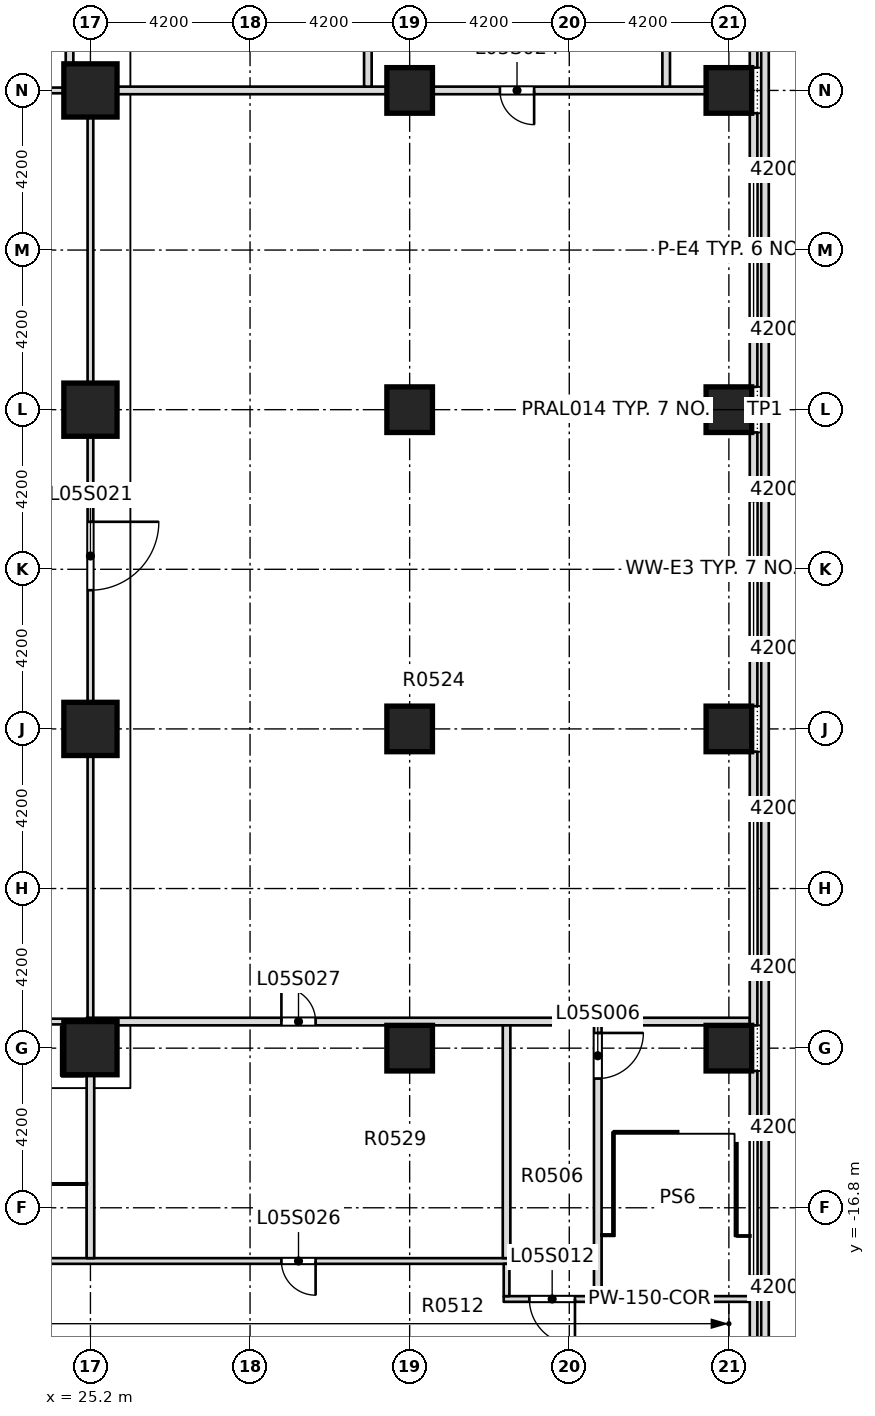
"""IFC4 building model, lengths in metres.
Left out: names, types, materials, properties, quantities, classifications, styles, units other than length and angle.
Written with IfcOpenShell. Run it as: python <this file> out.ifc"""

import sys

from ifc_helpers import new_model, si_unit, direction, frame, frame_2d, origin, origin_2d, place, context, subcontext, project, spatial, rectangle, extrude, element, fill, save


model = new_model("IFC4")
c1 = context("Model", 3, precision=1e-05, world=origin(), true_north=direction((0.0, 1.0)))
c2 = subcontext(c1, "Body", "Model", "MODEL_VIEW")
j1 = project(units=[si_unit("LENGTHUNIT", "METRE"), si_unit("PLANEANGLEUNIT", "RADIAN")], contexts=[c1])
p1 = place(None, origin())
s1 = spatial("IfcSite", under=j1, at=p1, CompositionType="ELEMENT")
p2 = place(p1, origin())
s2 = spatial("IfcBuilding", under=s1, at=p2, CompositionType="ELEMENT")
p3 = place(p2, frame((0.0, 0.0, 30.0)))
s3 = spatial("IfcBuildingStorey", under=s2, at=p3, CompositionType="ELEMENT", Elevation=30.0)
for number, where, z_axis, x_axis in (
    (1, (25.2, -12.6, -0.4), (0.0, 0.0, 1.0), (1.0, 0.0, 0.0)),
    (2, (25.2, -4.2, -0.4), (0.0, 0.0, 1.0), (1.0, 0.0, 0.0)),
    (3, (25.2, 4.2, -0.4), (0.0, 0.0, 1.0), (1.0, 0.0, 0.0)),
    (4, (25.2, 12.6, -0.4), (0.0, 0.0, 1.0), (1.0, 0.0, 0.0)),
):
    element("IfcColumn", number, at=place(p3, frame(where, z_axis=z_axis, x_axis=x_axis)), inside=s3, PredefinedType="COLUMN", context=c2, shape_type="SweptSolid", body=[
        extrude(rectangle(XDim=1.4, YDim=1.4, at=origin_2d()), origin(), (0.0, 0.0, 1.0), 4.58),
    ])
for number, where, z_axis, x_axis in (
    (5, (33.6, -12.6, 0.0), (0.0, 0.0, 1.0), (1.0, 0.0, 0.0)),
    (6, (42.0, -12.6, 0.0), (0.0, 0.0, 1.0), (1.0, 0.0, 0.0)),
    (7, (33.6, -4.2, 0.0), (0.0, 0.0, 1.0), (1.0, 0.0, 0.0)),
    (8, (42.0, -4.2, 0.0), (0.0, 0.0, 1.0), (1.0, 0.0, 0.0)),
    (9, (33.6, 4.2, 0.0), (0.0, 0.0, 1.0), (1.0, 0.0, 0.0)),
    (10, (42.0, 4.2, 0.0), (0.0, 0.0, 1.0), (1.0, 0.0, 0.0)),
    (11, (33.6, 12.6, 0.0), (0.0, 0.0, 1.0), (1.0, 0.0, 0.0)),
    (12, (42.0, 12.6, 0.0), (0.0, 0.0, 1.0), (1.0, 0.0, 0.0)),
):
    element("IfcColumn", number, at=place(p3, frame(where, z_axis=z_axis, x_axis=x_axis)), inside=s3, PredefinedType="COLUMN", context=c2, shape_type="SweptSolid", body=[
        extrude(rectangle(XDim=1.2, YDim=1.2, at=origin_2d()), origin(), (0.0, 0.0, 1.0), 4.18),
    ])
p4 = place(p3, frame((42.95, -21.85, 4.5), z_axis=(0.0, 0.0, 1.0), x_axis=(0.0, 1.0, 0.0)))
e13 = element("IfcWall", 13, at=p4, inside=s3, PredefinedType="PARAPET", context=c2, shape_type="SweptSolid", body=[
    extrude(rectangle(XDim=52.1, YDim=0.2, at=frame_2d((26.05, 0.0))), origin(), (0.0, 0.0, 1.0), 1.2),
])
p5 = place(p3, frame((36.075, -19.2, 0.0), z_axis=(0.0, 0.0, 1.0), x_axis=(1.0, 0.0, 0.0)))
e14 = element("IfcWall", 14, at=p5, inside=s3, PredefinedType="PARTITIONING", context=c2, shape_type="SweptSolid", body=[
    extrude(rectangle(XDim=6.475, YDim=0.15, at=frame_2d((3.238, 0.0))), origin(), (0.0, 0.0, 1.0), 4.18),
])
p6 = place(p5, frame((0.675, 0.0, 0.0)))
e15 = element("IfcOpeningElement", 15, at=p6, cuts=e14, PredefinedType="OPENING", context=c2, shape_type="SweptSolid", body=[
    extrude(rectangle(XDim=1.2, YDim=2.1, at=frame_2d((0.6, 1.05))), frame((0.0, 0.085, 0.0), z_axis=(0.0, -1.0, 0.0), x_axis=(1.0, 0.0, 0.0)), (0.0, 0.0, 1.0), 0.17),
])
p7 = place(p3, frame((12.25, -18.2, 0.0), z_axis=(0.0, 0.0, 1.0), x_axis=(1.0, 0.0, 0.0)))
e16 = element("IfcWall", 16, at=p7, inside=s3, PredefinedType="PARTITIONING", context=c2, shape_type="SweptSolid", body=[
    extrude(rectangle(XDim=24.0, YDim=0.15, at=frame_2d((12.0, 0.0))), origin(), (0.0, 0.0, 1.0), 4.18),
])
p8 = place(p7, frame((5.15, 0.0, 0.0)))
e17 = element("IfcOpeningElement", 17, at=p8, cuts=e16, PredefinedType="OPENING", context=c2, shape_type="SweptSolid", body=[
    extrude(rectangle(XDim=1.2, YDim=2.1, at=frame_2d((0.6, 1.05))), frame((0.0, 0.085, 0.0), z_axis=(0.0, -1.0, 0.0), x_axis=(1.0, 0.0, 0.0)), (0.0, 0.0, 1.0), 0.17),
])
p9 = place(p7, frame((17.975, 0.0, 0.0)))
e18 = element("IfcOpeningElement", 18, at=p9, cuts=e16, PredefinedType="OPENING", context=c2, shape_type="SweptSolid", body=[
    extrude(rectangle(XDim=0.9, YDim=2.1, at=frame_2d((0.45, 1.05))), frame((0.0, 0.085, 0.0), z_axis=(0.0, -1.0, 0.0), x_axis=(1.0, 0.0, 0.0)), (0.0, 0.0, 1.0), 0.17),
])
p10 = place(p7, frame((1.825, 0.0, 0.0)))
e19 = element("IfcOpeningElement", 19, at=p10, cuts=e16, PredefinedType="OPENING", context=c2, shape_type="SweptSolid", body=[
    extrude(rectangle(XDim=0.7, YDim=2.1, at=frame_2d((0.35, 1.05))), frame((0.0, 0.085, 0.0), z_axis=(0.0, -1.0, 0.0), x_axis=(1.0, 0.0, 0.0)), (0.0, 0.0, 1.0), 0.17),
])
p11 = place(p3, frame((16.725, -11.9, 0.0), z_axis=(0.0, 0.0, 1.0), x_axis=(1.0, 0.0, 0.0)))
e20 = element("IfcWall", 20, at=p11, inside=s3, PredefinedType="PARTITIONING", context=c2, shape_type="SweptSolid", body=[
    extrude(rectangle(XDim=8.575, YDim=0.15, at=frame_2d((4.288, 0.0))), origin(), (0.0, 0.0, 1.0), 4.18),
])
p12 = place(p3, frame((25.1, -11.9, 0.0), z_axis=(0.0, 0.0, 1.0), x_axis=(1.0, 0.0, 0.0)))
e21 = element("IfcWall", 21, at=p12, inside=s3, PredefinedType="PARTITIONING", context=c2, shape_type="SweptSolid", body=[
    extrude(rectangle(XDim=17.45, YDim=0.2, at=frame_2d((8.725, 0.0))), origin(), (0.0, 0.0, 1.0), 4.18),
])
p13 = place(p12, frame((5.125, 0.0, 0.0)))
e22 = element("IfcOpeningElement", 22, at=p13, cuts=e21, PredefinedType="OPENING", context=c2, shape_type="SweptSolid", body=[
    extrude(rectangle(XDim=0.9, YDim=2.1, at=frame_2d((0.45, 1.05))), frame((0.0, 0.11, 0.0), z_axis=(0.0, -1.0, 0.0), x_axis=(1.0, 0.0, 0.0)), (0.0, 0.0, 1.0), 0.22),
])
p14 = place(p3, frame((16.725, 12.6, 0.0), z_axis=(0.0, 0.0, 1.0), x_axis=(1.0, 0.0, 0.0)))
e23 = element("IfcWall", 23, at=p14, inside=s3, PredefinedType="PARTITIONING", context=c2, shape_type="SweptSolid", body=[
    extrude(rectangle(XDim=8.55, YDim=0.15, at=frame_2d((4.275, 0.0))), origin(), (0.0, 0.0, 1.0), 4.18),
])
p15 = place(p3, frame((25.125, 12.6, 0.0), z_axis=(0.0, 0.0, 1.0), x_axis=(1.0, 0.0, 0.0)))
e24 = element("IfcWall", 24, at=p15, inside=s3, PredefinedType="PARTITIONING", context=c2, shape_type="SweptSolid", body=[
    extrude(rectangle(XDim=17.425, YDim=0.2, at=frame_2d((8.712, 0.0))), origin(), (0.0, 0.0, 1.0), 4.18),
])
p16 = place(p15, frame((10.85, 0.0, 0.0)))
e25 = element("IfcOpeningElement", 25, at=p16, cuts=e24, PredefinedType="OPENING", context=c2, shape_type="SweptSolid", body=[
    extrude(rectangle(XDim=0.9, YDim=2.1, at=frame_2d((0.45, 1.05))), frame((0.0, 0.11, 0.0), z_axis=(0.0, -1.0, 0.0), x_axis=(1.0, 0.0, 0.0)), (0.0, 0.0, 1.0), 0.22),
])
p17 = place(p3, frame((24.65, 12.675, 0.0), z_axis=(0.0, 0.0, 1.0), x_axis=(0.0, 1.0, 0.0)))
e26 = element("IfcWall", 26, at=p17, inside=s3, PredefinedType="PARTITIONING", context=c2, shape_type="SweptSolid", body=[
    extrude(rectangle(XDim=9.0, YDim=0.2, at=frame_2d((4.5, 0.0))), origin(), (0.0, 0.0, 1.0), 4.18),
])
p18 = place(p3, frame((25.2, -18.125, 0.0), z_axis=(0.0, 0.0, 1.0), x_axis=(0.0, 1.0, 0.0)))
e27 = element("IfcWall", 27, at=p18, inside=s3, PredefinedType="PARTITIONING", context=c2, shape_type="SweptSolid", body=[
    extrude(rectangle(XDim=6.125, YDim=0.2, at=frame_2d((3.062, 0.0))), origin(), (0.0, 0.0, 1.0), 4.18),
])
p19 = place(p3, frame((25.2, -11.8, 0.0), z_axis=(0.0, 0.0, 1.0), x_axis=(0.0, 1.0, 0.0)))
e28 = element("IfcWall", 28, at=p19, inside=s3, PredefinedType="PARTITIONING", context=c2, shape_type="SweptSolid", body=[
    extrude(rectangle(XDim=24.3, YDim=0.15, at=frame_2d((12.15, 0.0))), origin(), (0.0, 0.0, 1.0), 4.18),
])
p20 = place(p19, frame((11.25, 0.0, 0.0)))
e29 = element("IfcOpeningElement", 29, at=p20, cuts=e28, PredefinedType="OPENING", context=c2, shape_type="SweptSolid", body=[
    extrude(rectangle(XDim=1.8, YDim=2.1, at=frame_2d((0.9, 1.05))), frame((0.0, 0.085, 0.0), z_axis=(0.0, -1.0, 0.0), x_axis=(1.0, 0.0, 0.0)), (0.0, 0.0, 1.0), 0.17),
])
p21 = place(p3, frame((32.5, 12.7, 0.0), z_axis=(0.0, 0.0, 1.0), x_axis=(0.0, 1.0, 0.0)))
e30 = element("IfcWall", 30, at=p21, inside=s3, PredefinedType="PARTITIONING", context=c2, shape_type="SweptSolid", body=[
    extrude(rectangle(XDim=8.975, YDim=0.2, at=frame_2d((4.488, 0.0))), origin(), (0.0, 0.0, 1.0), 4.18),
])
p22 = place(p3, frame((36.15, -19.125, 0.0), z_axis=(0.0, 0.0, 1.0), x_axis=(0.0, 1.0, 0.0)))
e31 = element("IfcWall", 31, at=p22, inside=s3, PredefinedType="PARTITIONING", context=c2, shape_type="SweptSolid", body=[
    extrude(rectangle(XDim=0.85, YDim=0.15, at=frame_2d((0.425, 0.0))), origin(), (0.0, 0.0, 1.0), 4.18),
])
p23 = place(p3, frame((36.15, -18.125, 0.0), z_axis=(0.0, 0.0, 1.0), x_axis=(0.0, 1.0, 0.0)))
e32 = element("IfcWall", 32, at=p23, inside=s3, PredefinedType="PARTITIONING", context=c2, shape_type="SweptSolid", body=[
    extrude(rectangle(XDim=6.125, YDim=0.2, at=frame_2d((3.062, 0.0))), origin(), (0.0, 0.0, 1.0), 4.18),
])
p24 = place(p3, frame((38.55, -19.125, 0.0), z_axis=(0.0, 0.0, 1.0), x_axis=(0.0, 1.0, 0.0)))
e33 = element("IfcWall", 33, at=p24, inside=s3, PredefinedType="PARTITIONING", context=c2, shape_type="SweptSolid", body=[
    extrude(rectangle(XDim=7.125, YDim=0.2, at=frame_2d((3.562, 0.0))), origin(), (0.0, 0.0, 1.0), 4.18),
])
p25 = place(p24, frame((5.725, 0.0, 0.0)))
e34 = element("IfcOpeningElement", 34, at=p25, cuts=e33, PredefinedType="OPENING", context=c2, shape_type="SweptSolid", body=[
    extrude(rectangle(XDim=1.2, YDim=2.1, at=frame_2d((0.6, 1.05))), frame((0.0, 0.11, 0.0), z_axis=(0.0, -1.0, 0.0), x_axis=(1.0, 0.0, 0.0)), (0.0, 0.0, 1.0), 0.22),
])
p26 = place(p3, frame((40.35, 12.7, 0.0), z_axis=(0.0, 0.0, 1.0), x_axis=(0.0, 1.0, 0.0)))
e35 = element("IfcWall", 35, at=p26, inside=s3, PredefinedType="PARTITIONING", context=c2, shape_type="SweptSolid", body=[
    extrude(rectangle(XDim=8.525, YDim=0.2, at=frame_2d((4.263, 0.0))), origin(), (0.0, 0.0, 1.0), 4.18),
])
p27 = place(p26, frame((3.812, 0.0, 0.0)))
e36 = element("IfcOpeningElement", 36, at=p27, cuts=e35, PredefinedType="OPENING", context=c2, shape_type="SweptSolid", body=[
    extrude(rectangle(XDim=0.9, YDim=2.1, at=frame_2d((0.45, 1.05))), frame((0.0, 0.11, 0.0), z_axis=(0.0, -1.0, 0.0), x_axis=(1.0, 0.0, 0.0)), (0.0, 0.0, 1.0), 0.22),
])
p28 = place(p3, frame((42.65, -20.4, 0.0), z_axis=(0.0, 0.0, 1.0), x_axis=(0.0, 1.0, 0.0)))
e37 = element("IfcWall", 37, at=p28, inside=s3, PredefinedType="STANDARD", context=c2, shape_type="SweptSolid", body=[
    extrude(rectangle(XDim=7.2, YDim=0.2, at=frame_2d((3.6, 0.0))), origin(), (0.0, 0.0, 1.0), 4.18),
])
p29 = place(p28, frame((1.8, 0.0, 0.9)))
e38 = element("IfcOpeningElement", 38, at=p29, cuts=e37, PredefinedType="OPENING", context=c2, shape_type="SweptSolid", body=[
    extrude(rectangle(XDim=3.6, YDim=2.4, at=frame_2d((1.8, 1.2))), frame((0.0, 0.11, 0.0), z_axis=(0.0, -1.0, 0.0), x_axis=(1.0, 0.0, 0.0)), (0.0, 0.0, 1.0), 0.22),
])
p30 = place(p3, frame((42.65, -12.0, 0.0), z_axis=(0.0, 0.0, 1.0), x_axis=(0.0, 1.0, 0.0)))
e39 = element("IfcWall", 39, at=p30, inside=s3, PredefinedType="STANDARD", context=c2, shape_type="SweptSolid", body=[
    extrude(rectangle(XDim=7.2, YDim=0.2, at=frame_2d((3.6, 0.0))), origin(), (0.0, 0.0, 1.0), 4.18),
])
p31 = place(p30, frame((1.8, 0.0, 0.9)))
e40 = element("IfcOpeningElement", 40, at=p31, cuts=e39, PredefinedType="OPENING", context=c2, shape_type="SweptSolid", body=[
    extrude(rectangle(XDim=3.6, YDim=2.4, at=frame_2d((1.8, 1.2))), frame((0.0, 0.11, 0.0), z_axis=(0.0, -1.0, 0.0), x_axis=(1.0, 0.0, 0.0)), (0.0, 0.0, 1.0), 0.22),
])
p32 = place(p3, frame((42.65, -3.6, 0.0), z_axis=(0.0, 0.0, 1.0), x_axis=(0.0, 1.0, 0.0)))
e41 = element("IfcWall", 41, at=p32, inside=s3, PredefinedType="STANDARD", context=c2, shape_type="SweptSolid", body=[
    extrude(rectangle(XDim=7.2, YDim=0.2, at=frame_2d((3.6, 0.0))), origin(), (0.0, 0.0, 1.0), 4.18),
])
p33 = place(p32, frame((1.8, 0.0, 0.9)))
e42 = element("IfcOpeningElement", 42, at=p33, cuts=e41, PredefinedType="OPENING", context=c2, shape_type="SweptSolid", body=[
    extrude(rectangle(XDim=3.6, YDim=2.4, at=frame_2d((1.8, 1.2))), frame((0.0, 0.11, 0.0), z_axis=(0.0, -1.0, 0.0), x_axis=(1.0, 0.0, 0.0)), (0.0, 0.0, 1.0), 0.22),
])
p34 = place(p3, frame((42.65, 4.8, 0.0), z_axis=(0.0, 0.0, 1.0), x_axis=(0.0, 1.0, 0.0)))
e43 = element("IfcWall", 43, at=p34, inside=s3, PredefinedType="STANDARD", context=c2, shape_type="SweptSolid", body=[
    extrude(rectangle(XDim=7.2, YDim=0.2, at=frame_2d((3.6, 0.0))), origin(), (0.0, 0.0, 1.0), 4.18),
])
p35 = place(p34, frame((1.8, 0.0, 0.9)))
e44 = element("IfcOpeningElement", 44, at=p35, cuts=e43, PredefinedType="OPENING", context=c2, shape_type="SweptSolid", body=[
    extrude(rectangle(XDim=3.6, YDim=2.4, at=frame_2d((1.8, 1.2))), frame((0.0, 0.11, 0.0), z_axis=(0.0, -1.0, 0.0), x_axis=(1.0, 0.0, 0.0)), (0.0, 0.0, 1.0), 0.22),
])
p36 = place(p3, frame((42.65, 13.2, 0.0), z_axis=(0.0, 0.0, 1.0), x_axis=(0.0, 1.0, 0.0)))
e45 = element("IfcWall", 45, at=p36, inside=s3, PredefinedType="STANDARD", context=c2, shape_type="SweptSolid", body=[
    extrude(rectangle(XDim=7.2, YDim=0.2, at=frame_2d((3.6, 0.0))), origin(), (0.0, 0.0, 1.0), 4.18),
])
p37 = place(p36, frame((1.8, 0.0, 0.9)))
e46 = element("IfcOpeningElement", 46, at=p37, cuts=e45, PredefinedType="OPENING", context=c2, shape_type="SweptSolid", body=[
    extrude(rectangle(XDim=3.6, YDim=2.4, at=frame_2d((1.8, 1.2))), frame((0.0, 0.11, 0.0), z_axis=(0.0, -1.0, 0.0), x_axis=(1.0, 0.0, 0.0)), (0.0, 0.0, 1.0), 0.22),
])
p38 = place(p25, origin())
e47 = element("IfcDoor", 47, at=p38, inside=s3, OperationType="DOUBLE_DOOR_SINGLE_SWING", PredefinedType="DOOR", context=c2, shape_type="SweptSolid", body=[
    extrude(rectangle(XDim=1.2, YDim=2.1, at=frame_2d((0.6, 1.05))), frame((0.0, 0.025, 0.0), z_axis=(0.0, -1.0, 0.0), x_axis=(1.0, 0.0, 0.0)), (0.0, 0.0, 1.0), 0.05),
])
fill(e34, e47)
p39 = place(p6, origin())
e48 = element("IfcDoor", 48, at=p39, inside=s3, OperationType="SINGLE_SWING_LEFT", PredefinedType="DOOR", context=c2, shape_type="SweptSolid", body=[
    extrude(rectangle(XDim=1.2, YDim=2.1, at=frame_2d((0.6, 1.05))), frame((0.0, 0.025, 0.0), z_axis=(0.0, -1.0, 0.0), x_axis=(1.0, 0.0, 0.0)), (0.0, 0.0, 1.0), 0.05),
])
fill(e15, e48)
p40 = place(p20, origin())
e49 = element("IfcDoor", 49, at=p40, inside=s3, OperationType="DOUBLE_DOOR_SINGLE_SWING", PredefinedType="DOOR", context=c2, shape_type="SweptSolid", body=[
    extrude(rectangle(XDim=1.8, YDim=2.1, at=frame_2d((0.9, 1.05))), frame((0.0, 0.025, 0.0), z_axis=(0.0, -1.0, 0.0), x_axis=(1.0, 0.0, 0.0)), (0.0, 0.0, 1.0), 0.05),
])
fill(e29, e49)
p41 = place(p16, origin())
e50 = element("IfcDoor", 50, at=p41, inside=s3, OperationType="SINGLE_SWING_RIGHT", PredefinedType="DOOR", context=c2, shape_type="SweptSolid", body=[
    extrude(rectangle(XDim=0.9, YDim=2.1, at=frame_2d((0.45, 1.05))), frame((0.0, 0.025, 0.0), z_axis=(0.0, -1.0, 0.0), x_axis=(1.0, 0.0, 0.0)), (0.0, 0.0, 1.0), 0.05),
])
fill(e25, e50)
p42 = place(p9, origin())
e51 = element("IfcDoor", 51, at=p42, inside=s3, OperationType="SINGLE_SWING_LEFT", PredefinedType="DOOR", context=c2, shape_type="SweptSolid", body=[
    extrude(rectangle(XDim=0.9, YDim=2.1, at=frame_2d((0.45, 1.05))), frame((0.0, 0.025, 0.0), z_axis=(0.0, -1.0, 0.0), x_axis=(1.0, 0.0, 0.0)), (0.0, 0.0, 1.0), 0.05),
])
fill(e18, e51)
p43 = place(p13, origin())
e52 = element("IfcDoor", 52, at=p43, inside=s3, OperationType="SINGLE_SWING_LEFT", PredefinedType="DOOR", context=c2, shape_type="SweptSolid", body=[
    extrude(rectangle(XDim=0.9, YDim=2.1, at=frame_2d((0.45, 1.05))), frame((0.0, 0.025, 0.0), z_axis=(0.0, -1.0, 0.0), x_axis=(1.0, 0.0, 0.0)), (0.0, 0.0, 1.0), 0.05),
])
fill(e22, e52)
p44 = place(p29, origin())
e53 = element("IfcWindow", 53, at=p44, inside=s3, PartitioningType="SINGLE_PANEL", PredefinedType="WINDOW", context=c2, shape_type="SweptSolid", body=[
    extrude(rectangle(XDim=3.6, YDim=2.4, at=frame_2d((1.8, 1.2))), frame((0.0, 0.03, 0.0), z_axis=(0.0, -1.0, 0.0), x_axis=(1.0, 0.0, 0.0)), (0.0, 0.0, 1.0), 0.06),
])
fill(e38, e53)
p45 = place(p31, origin())
e54 = element("IfcWindow", 54, at=p45, inside=s3, PartitioningType="SINGLE_PANEL", PredefinedType="WINDOW", context=c2, shape_type="SweptSolid", body=[
    extrude(rectangle(XDim=3.6, YDim=2.4, at=frame_2d((1.8, 1.2))), frame((0.0, 0.03, 0.0), z_axis=(0.0, -1.0, 0.0), x_axis=(1.0, 0.0, 0.0)), (0.0, 0.0, 1.0), 0.06),
])
fill(e40, e54)
p46 = place(p33, origin())
e55 = element("IfcWindow", 55, at=p46, inside=s3, PartitioningType="SINGLE_PANEL", PredefinedType="WINDOW", context=c2, shape_type="SweptSolid", body=[
    extrude(rectangle(XDim=3.6, YDim=2.4, at=frame_2d((1.8, 1.2))), frame((0.0, 0.03, 0.0), z_axis=(0.0, -1.0, 0.0), x_axis=(1.0, 0.0, 0.0)), (0.0, 0.0, 1.0), 0.06),
])
fill(e42, e55)
p47 = place(p35, origin())
e56 = element("IfcWindow", 56, at=p47, inside=s3, PartitioningType="SINGLE_PANEL", PredefinedType="WINDOW", context=c2, shape_type="SweptSolid", body=[
    extrude(rectangle(XDim=3.6, YDim=2.4, at=frame_2d((1.8, 1.2))), frame((0.0, 0.03, 0.0), z_axis=(0.0, -1.0, 0.0), x_axis=(1.0, 0.0, 0.0)), (0.0, 0.0, 1.0), 0.06),
])
fill(e44, e56)
save(model, sys.argv[1])
